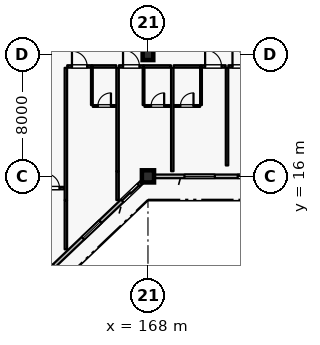
"""IFC4 building model, lengths in metres.
Left out: names, types, materials, properties, quantities, classifications, styles, units other than length and angle.
Written with IfcOpenShell. Run it as: python <this file> out.ifc"""

import sys

from ifc_helpers import new_model, si_unit, direction, frame, frame_2d, origin, origin_2d, place, context, subcontext, project, spatial, rectangle, extrude, element, fill, save


model = new_model("IFC4")
c1 = context("Model", 3, precision=1e-05, world=origin(), true_north=direction((0.0, 1.0)))
c2 = subcontext(c1, "Body", "Model", "MODEL_VIEW")
j1 = project(units=[si_unit("LENGTHUNIT", "METRE"), si_unit("PLANEANGLEUNIT", "RADIAN")], contexts=[c1])
p1 = place(None, origin())
s1 = spatial("IfcSite", under=j1, at=p1, CompositionType="ELEMENT")
p2 = place(p1, origin())
s2 = spatial("IfcBuilding", under=s1, at=p2, CompositionType="ELEMENT")
p3 = place(p2, frame((0.0, 0.0, 21.0)))
s3 = spatial("IfcBuildingStorey", under=s2, at=p3, CompositionType="ELEMENT", Elevation=21.0)
p4 = place(p3, frame((168.0, 16.0, 0.0), z_axis=(0.0, 0.0, 1.0), x_axis=(1.0, 0.0, 0.0)))
e1 = element("IfcColumn", 1, at=p4, inside=s3, PredefinedType="COLUMN", context=c2, shape_type="SweptSolid", body=[
    extrude(rectangle(XDim=0.8, YDim=0.8, at=origin_2d()), origin(), (0.0, 0.0, 1.0), 4.2),
])
p5 = place(p3, frame((168.0, 24.0, 0.0), z_axis=(0.0, 0.0, 1.0), x_axis=(1.0, 0.0, 0.0)))
e2 = element("IfcColumn", 2, at=p5, inside=s3, PredefinedType="COLUMN", context=c2, shape_type="SweptSolid", body=[
    extrude(rectangle(XDim=0.7, YDim=0.7, at=origin_2d()), origin(), (0.0, 0.0, 1.0), 4.2),
])
p6 = place(p3, frame((167.6, 15.619, 0.0), z_axis=(0.0, 0.0, 1.0), x_axis=(-0.724156739794, -0.689635422677, 0.0)))
e3 = element("IfcWall", 3, at=p6, inside=s3, PredefinedType="SOLIDWALL", context=c2, shape_type="SweptSolid", body=[
    extrude(rectangle(XDim=10.495, YDim=0.24, at=frame_2d((5.248, 0.0))), origin(), (0.0, 0.0, 1.0), 3.53),
])
p7 = place(p6, frame((0.286, 0.0, 0.0)))
e4 = element("IfcOpeningElement", 4, at=p7, cuts=e3, PredefinedType="OPENING", context=c2, shape_type="SweptSolid", body=[
    extrude(rectangle(XDim=1.5, YDim=2.25, at=frame_2d((0.75, 1.125))), frame((0.0, 0.13, 0.0), z_axis=(0.0, -1.0, 0.0), x_axis=(1.0, 0.0, 0.0)), (0.0, 0.0, 1.0), 0.26),
])
p8 = place(p6, frame((3.757, 0.0, 0.8)))
e5 = element("IfcOpeningElement", 5, at=p8, cuts=e3, PredefinedType="OPENING", context=c2, shape_type="SweptSolid", body=[
    extrude(rectangle(XDim=1.6, YDim=1.6, at=frame_2d((0.8, 0.8))), frame((0.0, 0.13, 0.0), z_axis=(0.0, -1.0, 0.0), x_axis=(1.0, 0.0, 0.0)), (0.0, 0.0, 1.0), 0.26),
])
p9 = place(p6, frame((7.969, 0.0, 0.8)))
e6 = element("IfcOpeningElement", 6, at=p9, cuts=e3, PredefinedType="OPENING", context=c2, shape_type="SweptSolid", body=[
    extrude(rectangle(XDim=1.6, YDim=1.6, at=frame_2d((0.8, 0.8))), frame((0.0, 0.13, 0.0), z_axis=(0.0, -1.0, 0.0), x_axis=(1.0, 0.0, 0.0)), (0.0, 0.0, 1.0), 0.26),
])
p10 = place(p3, frame((176.0, 16.0, 0.0), z_axis=(0.0, 0.0, 1.0), x_axis=(-1.0, 0.0, 0.0)))
e7 = element("IfcWall", 7, at=p10, inside=s3, PredefinedType="SOLIDWALL", context=c2, shape_type="SweptSolid", body=[
    extrude(rectangle(XDim=7.6, YDim=0.24, at=frame_2d((3.8, 0.0))), origin(), (0.0, 0.0, 1.0), 3.53),
])
p11 = place(p10, frame((0.6, 0.0, 0.0)))
e8 = element("IfcOpeningElement", 8, at=p11, cuts=e7, PredefinedType="OPENING", context=c2, shape_type="SweptSolid", body=[
    extrude(rectangle(XDim=1.5, YDim=2.25, at=frame_2d((0.75, 1.125))), frame((0.0, 0.13, 0.0), z_axis=(0.0, -1.0, 0.0), x_axis=(1.0, 0.0, 0.0)), (0.0, 0.0, 1.0), 0.26),
])
p12 = place(p10, frame((3.6, 0.0, 0.8)))
e9 = element("IfcOpeningElement", 9, at=p12, cuts=e7, PredefinedType="OPENING", context=c2, shape_type="SweptSolid", body=[
    extrude(rectangle(XDim=2.0, YDim=1.75, at=frame_2d((1.0, 0.875))), frame((0.0, 0.13, 0.0), z_axis=(0.0, -1.0, 0.0), x_axis=(1.0, 0.0, 0.0)), (0.0, 0.0, 1.0), 0.26),
])
p13 = place(p3, frame((160.89, 15.23, 0.0), z_axis=(0.0, 0.0, 1.0), x_axis=(1.0, 0.0, 0.0)))
e10 = element("IfcWall", 10, at=p13, inside=s3, PredefinedType="PARTITIONING", context=c2, shape_type="SweptSolid", body=[
    extrude(rectangle(XDim=1.62, YDim=0.16, at=frame_2d((0.81, 0.0))), origin(), (0.0, 0.0, 1.0), 3.965),
])
p14 = place(p13, frame((0.33, 0.0, 0.0)))
e11 = element("IfcOpeningElement", 11, at=p14, cuts=e10, PredefinedType="OPENING", context=c2, shape_type="SweptSolid", body=[
    extrude(rectangle(XDim=0.96, YDim=2.2, at=frame_2d((0.48, 1.1))), frame((0.0, 0.09, 0.0), z_axis=(0.0, -1.0, 0.0), x_axis=(1.0, 0.0, 0.0)), (0.0, 0.0, 1.0), 0.18),
])
p15 = place(p3, frame((162.6, 11.2, 0.0), z_axis=(0.0, 0.0, 1.0), x_axis=(0.0, 1.0, 0.0)))
e12 = element("IfcWall", 12, at=p15, inside=s3, PredefinedType="PARTITIONING", context=c2, shape_type="SweptSolid", body=[
    extrude(rectangle(XDim=3.23, YDim=0.16, at=frame_2d((1.615, 0.0))), origin(), (0.0, 0.0, 1.0), 3.965),
])
p16 = place(p3, frame((162.69, 23.23, 0.0), z_axis=(0.0, 0.0, 1.0), x_axis=(1.0, 0.0, 0.0)))
e13 = element("IfcWall", 13, at=p16, inside=s3, PredefinedType="PARTITIONING", context=c2, shape_type="SweptSolid", body=[
    extrude(rectangle(XDim=1.62, YDim=0.16, at=frame_2d((0.81, 0.0))), origin(), (0.0, 0.0, 1.0), 3.965),
])
p17 = place(p16, frame((0.31, 0.0, 0.0)))
e14 = element("IfcOpeningElement", 14, at=p17, cuts=e13, PredefinedType="OPENING", context=c2, shape_type="SweptSolid", body=[
    extrude(rectangle(XDim=1.0, YDim=2.25, at=frame_2d((0.5, 1.125))), frame((0.0, 0.09, 0.0), z_axis=(0.0, -1.0, 0.0), x_axis=(1.0, 0.0, 0.0)), (0.0, 0.0, 1.0), 0.18),
])
p18 = place(p3, frame((164.32, 23.23, 0.0), z_axis=(0.0, 0.0, 1.0), x_axis=(1.0, 0.0, 0.0)))
e15 = element("IfcWall", 15, at=p18, inside=s3, PredefinedType="PARTITIONING", context=c2, shape_type="SweptSolid", body=[
    extrude(rectangle(XDim=1.59, YDim=0.16, at=frame_2d((0.795, 0.0))), origin(), (0.0, 0.0, 1.0), 3.965),
])
p19 = place(p3, frame((164.31, 20.69, 0.0), z_axis=(0.0, 0.0, 1.0), x_axis=(0.0, 1.0, 0.0)))
e16 = element("IfcWall", 16, at=p19, inside=s3, PredefinedType="PARTITIONING", context=c2, shape_type="SweptSolid", body=[
    extrude(rectangle(XDim=2.45, YDim=0.115, at=frame_2d((1.225, 0.0))), origin(), (0.0, 0.0, 1.0), 3.965),
])
p20 = place(p3, frame((164.37, 20.63, 0.0), z_axis=(0.0, 0.0, 1.0), x_axis=(1.0, 0.0, 0.0)))
e17 = element("IfcWall", 17, at=p20, inside=s3, PredefinedType="PARTITIONING", context=c2, shape_type="SweptSolid", body=[
    extrude(rectangle(XDim=1.53, YDim=0.115, at=frame_2d((0.765, 0.0))), origin(), (0.0, 0.0, 1.0), 3.965),
])
p21 = place(p20, frame((0.335, 0.0, 0.0)))
e18 = element("IfcOpeningElement", 18, at=p21, cuts=e17, PredefinedType="OPENING", context=c2, shape_type="SweptSolid", body=[
    extrude(rectangle(XDim=0.86, YDim=2.12, at=frame_2d((0.43, 1.06))), frame((0.0, 0.067, 0.0), z_axis=(0.0, -1.0, 0.0), x_axis=(1.0, 0.0, 0.0)), (0.0, 0.0, 1.0), 0.135),
])
p22 = place(p3, frame((162.6, 14.44, 0.0), z_axis=(0.0, 0.0, 1.0), x_axis=(0.0, 1.0, 0.0)))
e19 = element("IfcWall", 19, at=p22, inside=s3, PredefinedType="PARTITIONING", context=c2, shape_type="SweptSolid", body=[
    extrude(rectangle(XDim=8.7, YDim=0.16, at=frame_2d((4.35, 0.0))), origin(), (0.0, 0.0, 1.0), 3.965),
])
p23 = place(p3, frame((166.0, 14.44, 0.0), z_axis=(0.0, 0.0, 1.0), x_axis=(0.0, 1.0, 0.0)))
e20 = element("IfcWall", 20, at=p23, inside=s3, PredefinedType="PARTITIONING", context=c2, shape_type="SweptSolid", body=[
    extrude(rectangle(XDim=1.89, YDim=0.16, at=frame_2d((0.945, 0.0))), origin(), (0.0, 0.0, 1.0), 3.965),
])
p24 = place(p3, frame((166.09, 23.23, 0.0), z_axis=(0.0, 0.0, 1.0), x_axis=(1.0, 0.0, 0.0)))
e21 = element("IfcWall", 21, at=p24, inside=s3, PredefinedType="PARTITIONING", context=c2, shape_type="SweptSolid", body=[
    extrude(rectangle(XDim=1.62, YDim=0.16, at=frame_2d((0.81, 0.0))), origin(), (0.0, 0.0, 1.0), 3.965),
])
p25 = place(p24, frame((0.27, 0.0, 0.0)))
e22 = element("IfcOpeningElement", 22, at=p25, cuts=e21, PredefinedType="OPENING", context=c2, shape_type="SweptSolid", body=[
    extrude(rectangle(XDim=1.08, YDim=2.3, at=frame_2d((0.54, 1.15))), frame((0.0, 0.09, 0.0), z_axis=(0.0, -1.0, 0.0), x_axis=(1.0, 0.0, 0.0)), (0.0, 0.0, 1.0), 0.18),
])
p26 = place(p3, frame((167.72, 23.23, 0.0), z_axis=(0.0, 0.0, 1.0), x_axis=(1.0, 0.0, 0.0)))
e23 = element("IfcWall", 23, at=p26, inside=s3, PredefinedType="PARTITIONING", context=c2, shape_type="SweptSolid", body=[
    extrude(rectangle(XDim=1.79, YDim=0.16, at=frame_2d((0.895, 0.0))), origin(), (0.0, 0.0, 1.0), 3.965),
])
p27 = place(p3, frame((167.71, 20.69, 0.0), z_axis=(0.0, 0.0, 1.0), x_axis=(0.0, 1.0, 0.0)))
e24 = element("IfcWall", 24, at=p27, inside=s3, PredefinedType="PARTITIONING", context=c2, shape_type="SweptSolid", body=[
    extrude(rectangle(XDim=2.45, YDim=0.115, at=frame_2d((1.225, 0.0))), origin(), (0.0, 0.0, 1.0), 3.965),
])
p28 = place(p3, frame((167.77, 20.63, 0.0), z_axis=(0.0, 0.0, 1.0), x_axis=(1.0, 0.0, 0.0)))
e25 = element("IfcWall", 25, at=p28, inside=s3, PredefinedType="PARTITIONING", context=c2, shape_type="SweptSolid", body=[
    extrude(rectangle(XDim=1.73, YDim=0.115, at=frame_2d((0.865, 0.0))), origin(), (0.0, 0.0, 1.0), 3.965),
])
p29 = place(p28, frame((0.435, 0.0, 0.0)))
e26 = element("IfcOpeningElement", 26, at=p29, cuts=e25, PredefinedType="OPENING", context=c2, shape_type="SweptSolid", body=[
    extrude(rectangle(XDim=0.86, YDim=2.12, at=frame_2d((0.43, 1.06))), frame((0.0, 0.067, 0.0), z_axis=(0.0, -1.0, 0.0), x_axis=(1.0, 0.0, 0.0)), (0.0, 0.0, 1.0), 0.135),
])
p30 = place(p3, frame((166.0, 16.34, 0.0), z_axis=(0.0, 0.0, 1.0), x_axis=(0.0, 1.0, 0.0)))
e27 = element("IfcWall", 27, at=p30, inside=s3, PredefinedType="PARTITIONING", context=c2, shape_type="SweptSolid", body=[
    extrude(rectangle(XDim=6.8, YDim=0.16, at=frame_2d((3.4, 0.0))), origin(), (0.0, 0.0, 1.0), 3.965),
])
p31 = place(p3, frame((169.69, 23.23, 0.0), z_axis=(0.0, 0.0, 1.0), x_axis=(1.0, 0.0, 0.0)))
e28 = element("IfcWall", 28, at=p31, inside=s3, PredefinedType="PARTITIONING", context=c2, shape_type="SweptSolid", body=[
    extrude(rectangle(XDim=1.79, YDim=0.16, at=frame_2d((0.895, 0.0))), origin(), (0.0, 0.0, 1.0), 3.965),
])
p32 = place(p3, frame((171.49, 23.23, 0.0), z_axis=(0.0, 0.0, 1.0), x_axis=(1.0, 0.0, 0.0)))
e29 = element("IfcWall", 29, at=p32, inside=s3, PredefinedType="PARTITIONING", context=c2, shape_type="SweptSolid", body=[
    extrude(rectangle(XDim=1.62, YDim=0.16, at=frame_2d((0.81, 0.0))), origin(), (0.0, 0.0, 1.0), 3.965),
])
p33 = place(p32, frame((0.27, 0.0, 0.0)))
e30 = element("IfcOpeningElement", 30, at=p33, cuts=e29, PredefinedType="OPENING", context=c2, shape_type="SweptSolid", body=[
    extrude(rectangle(XDim=1.08, YDim=2.3, at=frame_2d((0.54, 1.15))), frame((0.0, 0.09, 0.0), z_axis=(0.0, -1.0, 0.0), x_axis=(1.0, 0.0, 0.0)), (0.0, 0.0, 1.0), 0.18),
])
p34 = place(p3, frame((171.49, 20.69, 0.0), z_axis=(0.0, 0.0, 1.0), x_axis=(0.0, 1.0, 0.0)))
e31 = element("IfcWall", 31, at=p34, inside=s3, PredefinedType="PARTITIONING", context=c2, shape_type="SweptSolid", body=[
    extrude(rectangle(XDim=2.45, YDim=0.115, at=frame_2d((1.225, 0.0))), origin(), (0.0, 0.0, 1.0), 3.965),
])
p35 = place(p3, frame((169.7, 20.63, 0.0), z_axis=(0.0, 0.0, 1.0), x_axis=(1.0, 0.0, 0.0)))
e32 = element("IfcWall", 32, at=p35, inside=s3, PredefinedType="PARTITIONING", context=c2, shape_type="SweptSolid", body=[
    extrude(rectangle(XDim=1.73, YDim=0.115, at=frame_2d((0.865, 0.0))), origin(), (0.0, 0.0, 1.0), 3.965),
])
p36 = place(p35, frame((0.435, 0.0, 0.0)))
e33 = element("IfcOpeningElement", 33, at=p36, cuts=e32, PredefinedType="OPENING", context=c2, shape_type="SweptSolid", body=[
    extrude(rectangle(XDim=0.86, YDim=2.12, at=frame_2d((0.43, 1.06))), frame((0.0, 0.067, 0.0), z_axis=(0.0, -1.0, 0.0), x_axis=(1.0, 0.0, 0.0)), (0.0, 0.0, 1.0), 0.135),
])
p37 = place(p3, frame((169.6, 16.34, 0.0), z_axis=(0.0, 0.0, 1.0), x_axis=(0.0, 1.0, 0.0)))
e34 = element("IfcWall", 34, at=p37, inside=s3, PredefinedType="PARTITIONING", context=c2, shape_type="SweptSolid", body=[
    extrude(rectangle(XDim=6.8, YDim=0.16, at=frame_2d((3.4, 0.0))), origin(), (0.0, 0.0, 1.0), 3.965),
])
p38 = place(p3, frame((173.29, 23.23, 0.0), z_axis=(0.0, 0.0, 1.0), x_axis=(1.0, 0.0, 0.0)))
e35 = element("IfcWall", 35, at=p38, inside=s3, PredefinedType="PARTITIONING", context=c2, shape_type="SweptSolid", body=[
    extrude(rectangle(XDim=1.62, YDim=0.16, at=frame_2d((0.81, 0.0))), origin(), (0.0, 0.0, 1.0), 3.965),
])
p39 = place(p38, frame((0.27, 0.0, 0.0)))
e36 = element("IfcOpeningElement", 36, at=p39, cuts=e35, PredefinedType="OPENING", context=c2, shape_type="SweptSolid", body=[
    extrude(rectangle(XDim=1.08, YDim=2.3, at=frame_2d((0.54, 1.15))), frame((0.0, 0.09, 0.0), z_axis=(0.0, -1.0, 0.0), x_axis=(1.0, 0.0, 0.0)), (0.0, 0.0, 1.0), 0.18),
])
p40 = place(p3, frame((173.2, 16.72, 0.0), z_axis=(0.0, 0.0, 1.0), x_axis=(0.0, 1.0, 0.0)))
e37 = element("IfcWall", 37, at=p40, inside=s3, PredefinedType="PARTITIONING", context=c2, shape_type="SweptSolid", body=[
    extrude(rectangle(XDim=6.42, YDim=0.16, at=frame_2d((3.21, 0.0))), origin(), (0.0, 0.0, 1.0), 3.965),
])
p41 = place(p7, origin())
e38 = element("IfcDoor", 38, at=p41, inside=s3, OperationType="SLIDING_TO_LEFT", PredefinedType="DOOR", context=c2, shape_type="SweptSolid", body=[
    extrude(rectangle(XDim=1.5, YDim=2.25, at=frame_2d((0.75, 1.125))), frame((0.0, 0.025, 0.0), z_axis=(0.0, -1.0, 0.0), x_axis=(1.0, 0.0, 0.0)), (0.0, 0.0, 1.0), 0.05),
])
fill(e4, e38)
p42 = place(p8, origin())
e39 = element("IfcWindow", 39, at=p42, inside=s3, PartitioningType="SINGLE_PANEL", PredefinedType="WINDOW", context=c2, shape_type="SweptSolid", body=[
    extrude(rectangle(XDim=1.6, YDim=1.6, at=frame_2d((0.8, 0.8))), frame((0.0, 0.03, 0.0), z_axis=(0.0, -1.0, 0.0), x_axis=(1.0, 0.0, 0.0)), (0.0, 0.0, 1.0), 0.06),
])
fill(e5, e39)
p43 = place(p9, origin())
e40 = element("IfcWindow", 40, at=p43, inside=s3, PartitioningType="SINGLE_PANEL", PredefinedType="WINDOW", context=c2, shape_type="SweptSolid", body=[
    extrude(rectangle(XDim=1.6, YDim=1.6, at=frame_2d((0.8, 0.8))), frame((0.0, 0.03, 0.0), z_axis=(0.0, -1.0, 0.0), x_axis=(1.0, 0.0, 0.0)), (0.0, 0.0, 1.0), 0.06),
])
fill(e6, e40)
p44 = place(p11, origin())
e41 = element("IfcDoor", 41, at=p44, inside=s3, OperationType="SLIDING_TO_LEFT", PredefinedType="DOOR", context=c2, shape_type="SweptSolid", body=[
    extrude(rectangle(XDim=1.5, YDim=2.25, at=frame_2d((0.75, 1.125))), frame((0.0, 0.025, 0.0), z_axis=(0.0, -1.0, 0.0), x_axis=(1.0, 0.0, 0.0)), (0.0, 0.0, 1.0), 0.05),
])
fill(e8, e41)
p45 = place(p12, origin())
e42 = element("IfcWindow", 42, at=p45, inside=s3, PartitioningType="DOUBLE_PANEL_VERTICAL", PredefinedType="WINDOW", context=c2, shape_type="SweptSolid", body=[
    extrude(rectangle(XDim=2.0, YDim=1.75, at=frame_2d((1.0, 0.875))), frame((0.0, 0.03, 0.0), z_axis=(0.0, -1.0, 0.0), x_axis=(1.0, 0.0, 0.0)), (0.0, 0.0, 1.0), 0.06),
])
fill(e9, e42)
p46 = place(p14, origin())
e43 = element("IfcDoor", 43, at=p46, inside=s3, OperationType="SINGLE_SWING_LEFT", PredefinedType="DOOR", context=c2, shape_type="SweptSolid", body=[
    extrude(rectangle(XDim=0.96, YDim=2.2, at=frame_2d((0.48, 1.1))), frame((0.0, 0.025, 0.0), z_axis=(0.0, -1.0, 0.0), x_axis=(1.0, 0.0, 0.0)), (0.0, 0.0, 1.0), 0.05),
])
fill(e11, e43)
p47 = place(p17, origin())
e44 = element("IfcDoor", 44, at=p47, inside=s3, OperationType="SINGLE_SWING_LEFT", PredefinedType="DOOR", context=c2, shape_type="SweptSolid", body=[
    extrude(rectangle(XDim=1.0, YDim=2.25, at=frame_2d((0.5, 1.125))), frame((0.0, 0.025, 0.0), z_axis=(0.0, -1.0, 0.0), x_axis=(1.0, 0.0, 0.0)), (0.0, 0.0, 1.0), 0.05),
])
fill(e14, e44)
p48 = place(p21, origin())
e45 = element("IfcDoor", 45, at=p48, inside=s3, OperationType="SINGLE_SWING_RIGHT", PredefinedType="DOOR", context=c2, shape_type="SweptSolid", body=[
    extrude(rectangle(XDim=0.86, YDim=2.12, at=frame_2d((0.43, 1.06))), frame((0.0, 0.025, 0.0), z_axis=(0.0, -1.0, 0.0), x_axis=(1.0, 0.0, 0.0)), (0.0, 0.0, 1.0), 0.05),
])
fill(e18, e45)
p49 = place(p25, origin())
e46 = element("IfcDoor", 46, at=p49, inside=s3, OperationType="SINGLE_SWING_LEFT", PredefinedType="DOOR", context=c2, shape_type="SweptSolid", body=[
    extrude(rectangle(XDim=1.08, YDim=2.3, at=frame_2d((0.54, 1.15))), frame((0.0, 0.025, 0.0), z_axis=(0.0, -1.0, 0.0), x_axis=(1.0, 0.0, 0.0)), (0.0, 0.0, 1.0), 0.05),
])
fill(e22, e46)
p50 = place(p29, origin())
e47 = element("IfcDoor", 47, at=p50, inside=s3, OperationType="SINGLE_SWING_RIGHT", PredefinedType="DOOR", context=c2, shape_type="SweptSolid", body=[
    extrude(rectangle(XDim=0.86, YDim=2.12, at=frame_2d((0.43, 1.06))), frame((0.0, 0.025, 0.0), z_axis=(0.0, -1.0, 0.0), x_axis=(1.0, 0.0, 0.0)), (0.0, 0.0, 1.0), 0.05),
])
fill(e26, e47)
p51 = place(p33, origin())
e48 = element("IfcDoor", 48, at=p51, inside=s3, OperationType="SINGLE_SWING_LEFT", PredefinedType="DOOR", context=c2, shape_type="SweptSolid", body=[
    extrude(rectangle(XDim=1.08, YDim=2.3, at=frame_2d((0.54, 1.15))), frame((0.0, 0.025, 0.0), z_axis=(0.0, -1.0, 0.0), x_axis=(1.0, 0.0, 0.0)), (0.0, 0.0, 1.0), 0.05),
])
fill(e30, e48)
p52 = place(p36, origin())
e49 = element("IfcDoor", 49, at=p52, inside=s3, OperationType="SINGLE_SWING_RIGHT", PredefinedType="DOOR", context=c2, shape_type="SweptSolid", body=[
    extrude(rectangle(XDim=0.86, YDim=2.12, at=frame_2d((0.43, 1.06))), frame((0.0, 0.025, 0.0), z_axis=(0.0, -1.0, 0.0), x_axis=(1.0, 0.0, 0.0)), (0.0, 0.0, 1.0), 0.05),
])
fill(e33, e49)
p53 = place(p39, origin())
e50 = element("IfcDoor", 50, at=p53, inside=s3, OperationType="SINGLE_SWING_LEFT", PredefinedType="DOOR", context=c2, shape_type="SweptSolid", body=[
    extrude(rectangle(XDim=1.08, YDim=2.3, at=frame_2d((0.54, 1.15))), frame((0.0, 0.025, 0.0), z_axis=(0.0, -1.0, 0.0), x_axis=(1.0, 0.0, 0.0)), (0.0, 0.0, 1.0), 0.05),
])
fill(e36, e50)
save(model, sys.argv[1])
